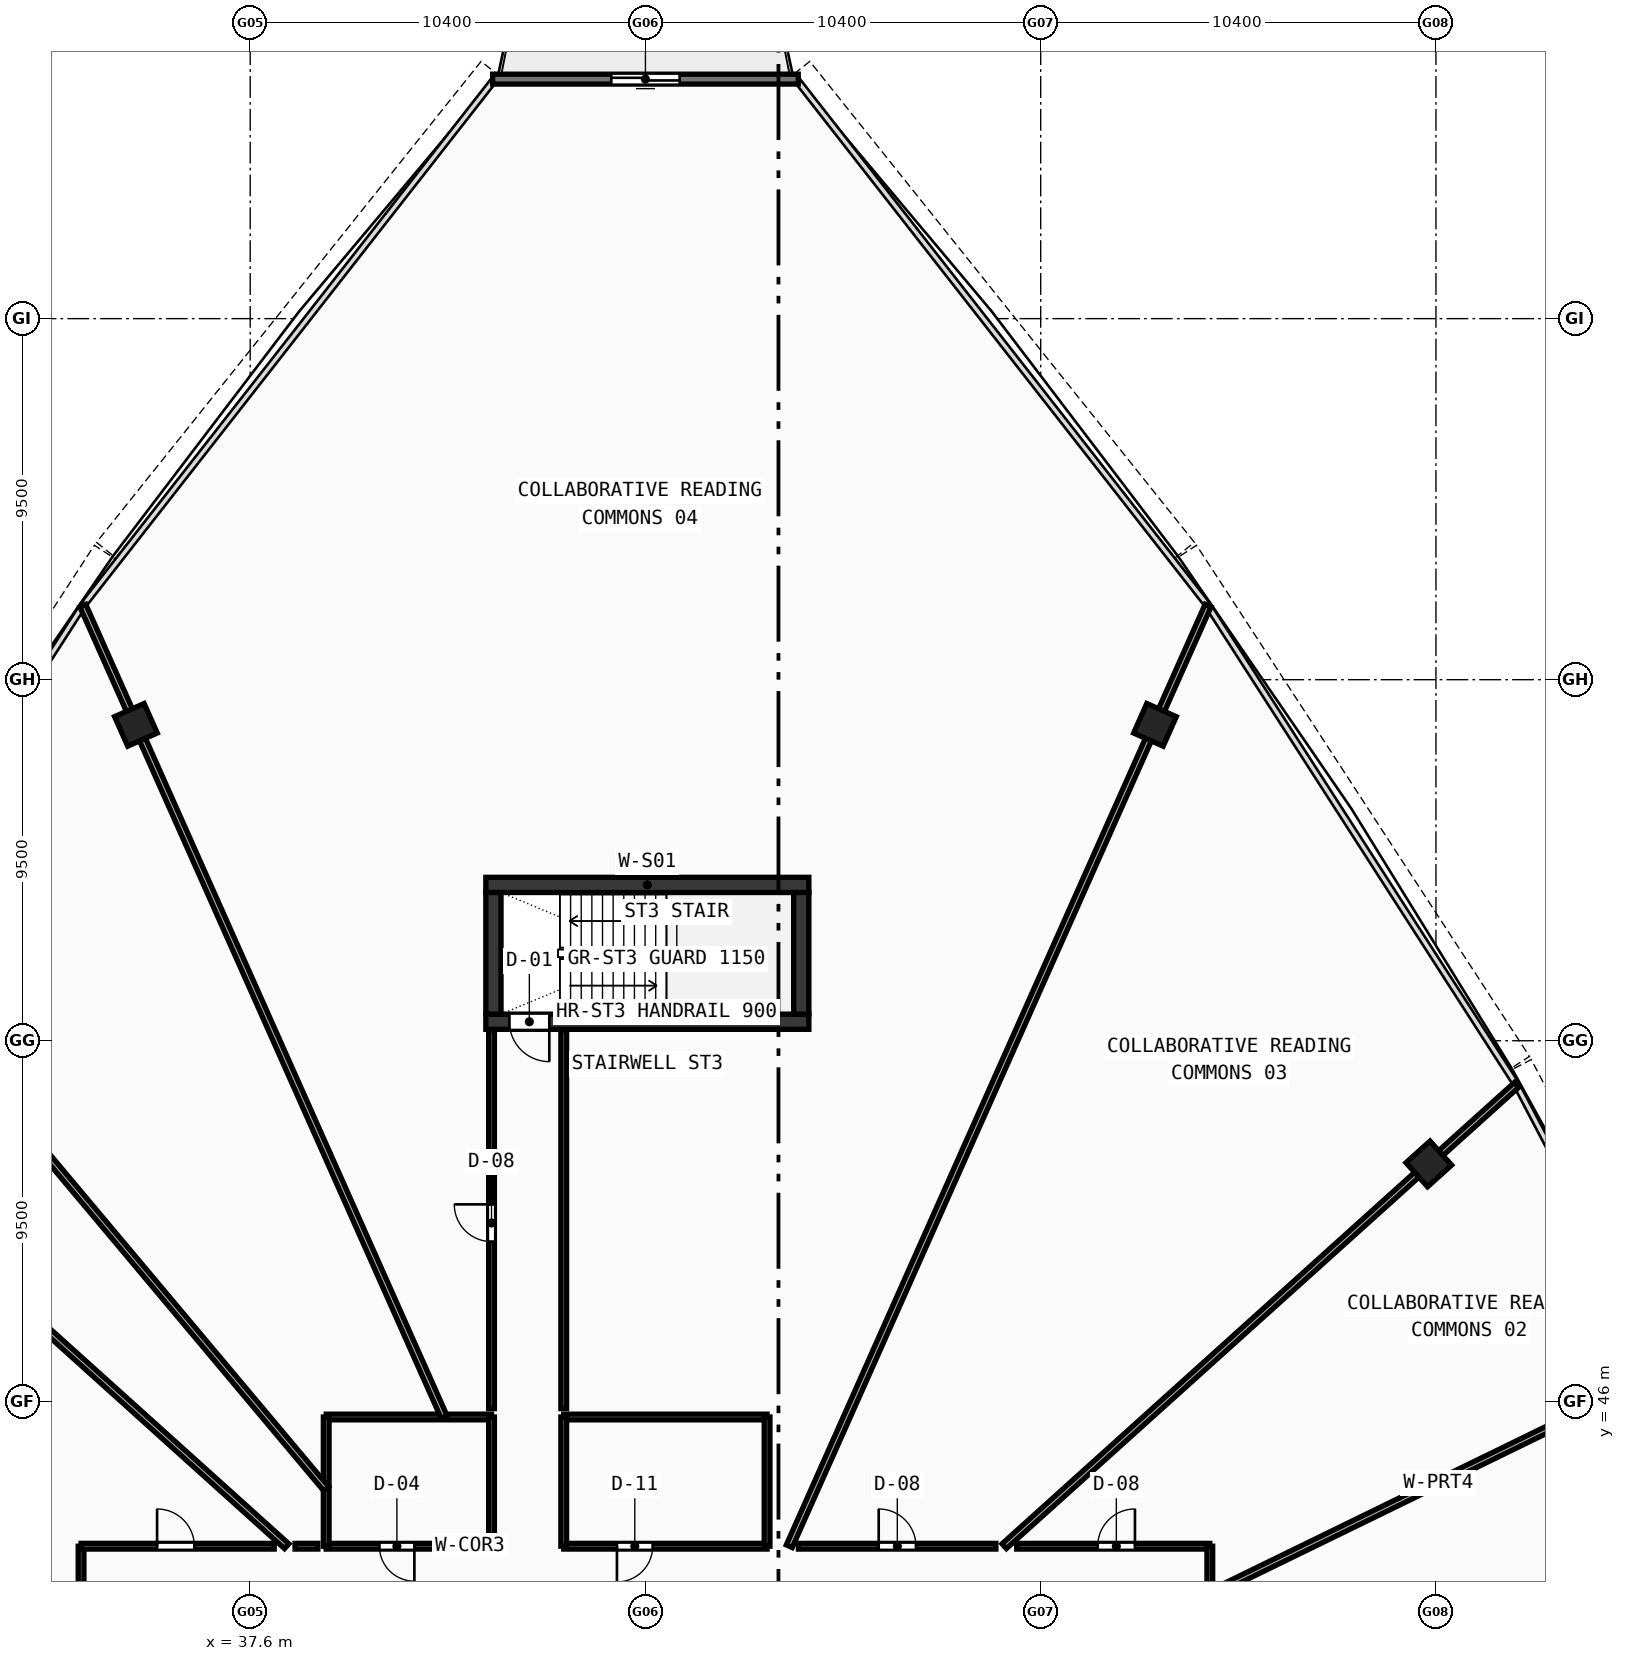
"""IFC4 building model, lengths in metres.
Left out: names, types, materials, properties, quantities, classifications, styles, units other than length and angle.
Written with IfcOpenShell. Run it as: python <this file> out.ifc"""

import sys

from ifc_helpers import new_model, si_unit, direction, frame, frame_2d, origin, origin_with_axes, origin_2d, place, context, subcontext, project, spatial, rectangle, hollow_rectangle, extrude, source, transform, mapped, element, fill, save


model = new_model("IFC4")
c1 = context("Model", 3, precision=1e-05, world=origin(), true_north=direction((0.0, 1.0)))
c2 = subcontext(c1, "Body", "Model", "MODEL_VIEW")
j1 = project(units=[si_unit("LENGTHUNIT", "METRE"), si_unit("PLANEANGLEUNIT", "RADIAN")], contexts=[c1])
p1 = place(None, origin())
s1 = spatial("IfcSite", under=j1, at=p1, CompositionType="ELEMENT")
p2 = place(p1, origin())
s2 = spatial("IfcBuilding", under=s1, at=p2, CompositionType="ELEMENT")
p3 = place(p2, frame((0.0, 0.0, 233.34)))
s3 = spatial("IfcBuildingStorey", under=s2, at=p3, CompositionType="ELEMENT", Elevation=233.34)
p4 = place(p3, frame((43.8, 59.6, 0.0), z_axis=(0.0, 0.0, 1.0), x_axis=(1.0, 0.0, 0.0)))
e1 = element("IfcWall", 1, at=p4, inside=s3, PredefinedType="SHEAR", context=c2, shape_type="SweptSolid", body=[
    extrude(rectangle(XDim=8.5, YDim=0.4, at=frame_2d((4.25, 0.0))), origin(), (0.0, 0.0, 1.0), 3.47),
])
p5 = place(p3, frame((43.8, 56.0, 0.0), z_axis=(0.0, 0.0, 1.0), x_axis=(1.0, 0.0, 0.0)))
e2 = element("IfcWall", 2, at=p5, inside=s3, PredefinedType="SHEAR", context=c2, shape_type="SweptSolid", body=[
    extrude(rectangle(XDim=8.5, YDim=0.4, at=frame_2d((4.25, 0.0))), origin(), (0.0, 0.0, 1.0), 3.47),
])
p6 = place(p5, frame((0.62, 0.0, 0.0)))
e3 = element("IfcOpeningElement", 3, at=p6, cuts=e2, PredefinedType="OPENING", context=c2, shape_type="SweptSolid", body=[
    extrude(rectangle(XDim=1.05, YDim=2.1, at=frame_2d((0.525, 1.05))), frame((0.0, 0.21, 0.0), z_axis=(0.0, -1.0, 0.0), x_axis=(1.0, 0.0, 0.0)), (0.0, 0.0, 1.0), 0.42),
])
for number, where, z_axis, x_axis in (
    (4, (44.0, 56.2, 0.0), (0.0, 0.0, 1.0), (0.0, 1.0, 0.0)),
    (5, (52.1, 56.2, 0.0), (0.0, 0.0, 1.0), (0.0, 1.0, 0.0)),
):
    element("IfcWall", number, at=place(p3, frame(where, z_axis=z_axis, x_axis=x_axis)), inside=s3, PredefinedType="SHEAR", context=c2, shape_type="SweptSolid", body=[
        extrude(rectangle(XDim=3.2, YDim=0.4, at=frame_2d((1.6, 0.0))), origin(), (0.0, 0.0, 1.0), 3.47),
    ])
m1 = source(origin(), c2, "Body", "SweptSolid", [
    extrude(hollow_rectangle(XDim=0.85, YDim=0.85, WallThickness=0.034, at=origin_2d()), origin(), (0.0, 0.0, 1.0), 3.73),
])
for number, where, z_axis, x_axis in (
    (6, (68.612, 52.259, -0.26), (0.0, 0.0, 1.0), (-0.669, 0.743, 0.0)),
    (7, (61.407, 63.812, -0.26), (0.0, 0.0, 1.0), (-0.914, 0.407, 0.0)),
    (8, (34.593, 63.812, -0.26), (0.0, 0.0, 1.0), (-0.914, -0.407, 0.0)),
):
    element("IfcColumn", number, at=place(p3, frame(where, z_axis=z_axis, x_axis=x_axis)), inside=s3, PredefinedType="COLUMN", context=c2, shape_type="MappedRepresentation", body=[
        mapped(m1, transform((0.0, 0.0, 0.0), scale=1.0)),
    ])
p7 = place(p3, frame((52.021, 80.802, 0.0), z_axis=(0.0, 0.0, 1.0), x_axis=(-1.0, 0.0, 0.0)))
e9 = element("IfcWall", 9, at=p7, inside=s3, PredefinedType="STANDARD", context=c2, shape_type="SweptSolid", body=[
    extrude(rectangle(XDim=8.042, YDim=0.26, at=frame_2d((4.021, 0.0))), origin(), (0.0, 0.0, 1.0), 3.47),
])
p8 = place(p7, frame((3.121, 0.0, 0.0)))
e10 = element("IfcOpeningElement", 10, at=p8, cuts=e9, PredefinedType="OPENING", context=c2, shape_type="SweptSolid", body=[
    extrude(rectangle(XDim=1.8, YDim=2.15, at=frame_2d((0.9, 1.075))), frame((0.0, 0.14, 0.0), z_axis=(0.0, -1.0, 0.0), x_axis=(1.0, 0.0, 0.0)), (0.0, 0.0, 1.0), 0.28),
])
p9 = place(p3, frame((39.6, 42.2, 0.0), z_axis=(0.0, 0.0, 1.0), x_axis=(1.0, 0.0, 0.0)))
e11 = element("IfcWall", 11, at=p9, inside=s3, PredefinedType="PARTITIONING", context=c2, shape_type="SweptSolid", body=[
    extrude(rectangle(XDim=4.35, YDim=0.15, at=frame_2d((2.175, 0.0))), origin(), (0.0, 0.0, 1.0), 3.47),
])
p10 = place(p9, frame((1.4, 0.0, 0.0)))
e12 = element("IfcOpeningElement", 12, at=p10, cuts=e11, PredefinedType="OPENING", context=c2, shape_type="SweptSolid", body=[
    extrude(rectangle(XDim=0.92, YDim=2.1, at=frame_2d((0.46, 1.05))), frame((0.0, 0.085, 0.0), z_axis=(0.0, -1.0, 0.0), x_axis=(1.0, 0.0, 0.0)), (0.0, 0.0, 1.0), 0.17),
])
p11 = place(p3, frame((39.6, 45.6, 0.0), z_axis=(0.0, 0.0, 1.0), x_axis=(1.0, 0.0, 0.0)))
e13 = element("IfcWall", 13, at=p11, inside=s3, PredefinedType="PARTITIONING", context=c2, shape_type="SweptSolid", body=[
    extrude(rectangle(XDim=4.35, YDim=0.15, at=frame_2d((2.175, 0.0))), origin(), (0.0, 0.0, 1.0), 2.82),
])
p12 = place(p3, frame((39.6, 42.2, 0.0), z_axis=(0.0, 0.0, 1.0), x_axis=(0.0, 1.0, 0.0)))
e14 = element("IfcWall", 14, at=p12, inside=s3, PredefinedType="PARTITIONING", context=c2, shape_type="SweptSolid", body=[
    extrude(rectangle(XDim=3.4, YDim=0.15, at=frame_2d((1.7, 0.0))), origin(), (0.0, 0.0, 1.0), 3.47),
])
p13 = place(p3, frame((43.95, 42.2, 0.0), z_axis=(0.0, 0.0, 1.0), x_axis=(0.0, 1.0, 0.0)))
e15 = element("IfcWall", 15, at=p13, inside=s3, PredefinedType="PARTITIONING", context=c2, shape_type="SweptSolid", body=[
    extrude(rectangle(XDim=3.4, YDim=0.15, at=frame_2d((1.7, 0.0))), origin(), (0.0, 0.0, 1.0), 2.82),
])
p14 = place(p3, frame((45.85, 42.2, 0.0), z_axis=(0.0, 0.0, 1.0), x_axis=(1.0, 0.0, 0.0)))
e16 = element("IfcWall", 16, at=p14, inside=s3, PredefinedType="PARTITIONING", context=c2, shape_type="SweptSolid", body=[
    extrude(rectangle(XDim=5.35, YDim=0.15, at=frame_2d((2.675, 0.0))), origin(), (0.0, 0.0, 1.0), 3.47),
])
p15 = place(p14, frame((1.4, 0.0, 0.0)))
e17 = element("IfcOpeningElement", 17, at=p15, cuts=e16, PredefinedType="OPENING", context=c2, shape_type="SweptSolid", body=[
    extrude(rectangle(XDim=0.94, YDim=2.1, at=frame_2d((0.47, 1.05))), frame((0.0, 0.085, 0.0), z_axis=(0.0, -1.0, 0.0), x_axis=(1.0, 0.0, 0.0)), (0.0, 0.0, 1.0), 0.17),
])
p16 = place(p3, frame((45.85, 45.6, 0.0), z_axis=(0.0, 0.0, 1.0), x_axis=(1.0, 0.0, 0.0)))
e18 = element("IfcWall", 18, at=p16, inside=s3, PredefinedType="PARTITIONING", context=c2, shape_type="SweptSolid", body=[
    extrude(rectangle(XDim=5.35, YDim=0.15, at=frame_2d((2.675, 0.0))), origin(), (0.0, 0.0, 1.0), 3.47),
])
for number, where, z_axis, x_axis in (
    (19, (45.85, 42.2, 0.0), (0.0, 0.0, 1.0), (0.0, 1.0, 0.0)),
    (20, (51.2, 42.2, 0.0), (0.0, 0.0, 1.0), (0.0, 1.0, 0.0)),
):
    element("IfcWall", number, at=place(p3, frame(where, z_axis=z_axis, x_axis=x_axis)), inside=s3, PredefinedType="PARTITIONING", context=c2, shape_type="SweptSolid", body=[
        extrude(rectangle(XDim=3.4, YDim=0.15, at=frame_2d((1.7, 0.0))), origin(), (0.0, 0.0, 1.0), 3.47),
    ])
p17 = place(p3, frame((62.85, 40.943, 0.0), z_axis=(0.0, 0.0, 1.0), x_axis=(0.89879807188, 0.438362893029, 0.0)))
e21 = element("IfcWall", 21, at=p17, inside=s3, PredefinedType="PARTITIONING", context=c2, shape_type="SweptSolid", body=[
    extrude(rectangle(XDim=13.384, YDim=0.17, at=frame_2d((6.692, 0.0))), origin(), (0.0, 0.0, 1.0), 2.82),
])
p18 = place(p3, frame((57.44, 42.2, 0.0), z_axis=(0.0, 0.0, 1.0), x_axis=(0.743147575456, 0.669127552185, 0.0)))
e22 = element("IfcWall", 22, at=p18, inside=s3, PredefinedType="PARTITIONING", context=c2, shape_type="SweptSolid", body=[
    extrude(rectangle(XDim=18.141, YDim=0.17, at=frame_2d((9.07, 0.0))), origin(), (0.0, 0.0, 1.0), 2.82),
])
p19 = place(p3, frame((51.784, 42.2, 0.0), z_axis=(0.0, 0.0, 1.0), x_axis=(0.406737084028, 0.913545261318, 0.0)))
e23 = element("IfcWall", 23, at=p19, inside=s3, PredefinedType="PARTITIONING", context=c2, shape_type="SweptSolid", body=[
    extrude(rectangle(XDim=27.09, YDim=0.17, at=frame_2d((13.545, 0.0))), origin(), (0.0, 0.0, 1.0), 2.82),
])
p20 = place(p3, frame((42.702, 45.6, 0.0), z_axis=(0.0, 0.0, 1.0), x_axis=(-0.406743256781, 0.913542513003, 0.0)))
e24 = element("IfcWall", 24, at=p20, inside=s3, PredefinedType="PARTITIONING", context=c2, shape_type="SweptSolid", body=[
    extrude(rectangle(XDim=23.368, YDim=0.17, at=frame_2d((11.684, 0.0))), origin(), (0.0, 0.0, 1.0), 2.82),
])
p21 = place(p3, frame((39.6, 43.711, 0.0), z_axis=(0.0, 0.0, 1.0), x_axis=(-0.642791950905, 0.766040800383, 0.0)))
e25 = element("IfcWall", 25, at=p21, inside=s3, PredefinedType="PARTITIONING", context=c2, shape_type="SweptSolid", body=[
    extrude(rectangle(XDim=18.806, YDim=0.17, at=frame_2d((9.403, 0.0))), origin(), (0.0, 0.0, 1.0), 2.82),
])
p22 = place(p3, frame((38.56, 42.2, 0.0), z_axis=(0.0, 0.0, 1.0), x_axis=(-0.743147575456, 0.669127552185, 0.0)))
e26 = element("IfcWall", 26, at=p22, inside=s3, PredefinedType="PARTITIONING", context=c2, shape_type="SweptSolid", body=[
    extrude(rectangle(XDim=18.141, YDim=0.17, at=frame_2d((9.07, 0.0))), origin(), (0.0, 0.0, 1.0), 2.82),
])
p23 = place(p3, frame((33.15, 38.525, 0.0), z_axis=(0.0, 0.0, 1.0), x_axis=(-0.951058452106, 0.309011036497, 0.0)))
e27 = element("IfcWall", 27, at=p23, inside=s3, PredefinedType="PARTITIONING", context=c2, shape_type="SweptSolid", body=[
    extrude(rectangle(XDim=14.714, YDim=0.17, at=frame_2d((7.357, 0.0))), origin(), (0.0, 0.0, 1.0), 2.82),
])
p24 = place(p3, frame((33.15, 38.756, 0.0), z_axis=(0.0, 0.0, 1.0), x_axis=(0.0, 1.0, 0.0)))
e28 = element("IfcWall", 28, at=p24, inside=s3, PredefinedType="PARTITIONING", context=c2, shape_type="SweptSolid", body=[
    extrude(rectangle(XDim=3.444, YDim=0.15, at=frame_2d((1.722, 0.0))), origin(), (0.0, 0.0, 1.0), 3.12),
])
p25 = place(p3, frame((33.15, 42.2, 0.0), z_axis=(0.0, 0.0, 1.0), x_axis=(1.0, 0.0, 0.0)))
e29 = element("IfcWall", 29, at=p25, inside=s3, PredefinedType="PARTITIONING", context=c2, shape_type="SweptSolid", body=[
    extrude(rectangle(XDim=5.081, YDim=0.15, at=frame_2d((2.541, 0.0))), origin(), (0.0, 0.0, 1.0), 3.12),
])
p26 = place(p25, frame((2.0, 0.0, 0.0)))
e30 = element("IfcOpeningElement", 30, at=p26, cuts=e29, PredefinedType="OPENING", context=c2, shape_type="SweptSolid", body=[
    extrude(rectangle(XDim=0.98, YDim=2.12, at=frame_2d((0.49, 1.06))), frame((0.0, 0.085, 0.0), z_axis=(0.0, -1.0, 0.0), x_axis=(1.0, 0.0, 0.0)), (0.0, 0.0, 1.0), 0.17),
])
p27 = place(p3, frame((38.78, 42.2, 0.0), z_axis=(0.0, 0.0, 1.0), x_axis=(1.0, 0.0, 0.0)))
e31 = element("IfcWall", 31, at=p27, inside=s3, PredefinedType="PARTITIONING", context=c2, shape_type="SweptSolid", body=[
    extrude(rectangle(XDim=0.6, YDim=0.15, at=frame_2d((0.3, 0.0))), origin(), (0.0, 0.0, 1.0), 2.82),
])
p28 = place(p3, frame((43.95, 45.82, 0.0), z_axis=(0.0, 0.0, 1.0), x_axis=(0.0, 1.0, 0.0)))
e32 = element("IfcWall", 32, at=p28, inside=s3, PredefinedType="PARTITIONING", context=c2, shape_type="SweptSolid", body=[
    extrude(rectangle(XDim=9.96, YDim=0.15, at=frame_2d((4.98, 0.0))), origin(), (0.0, 0.0, 1.0), 3.12),
])
p29 = place(p28, frame((4.395, 0.0, 0.0)))
e33 = element("IfcOpeningElement", 33, at=p29, cuts=e32, PredefinedType="OPENING", context=c2, shape_type="SweptSolid", body=[
    extrude(rectangle(XDim=0.98, YDim=2.12, at=frame_2d((0.49, 1.06))), frame((0.0, 0.085, 0.0), z_axis=(0.0, -1.0, 0.0), x_axis=(1.0, 0.0, 0.0)), (0.0, 0.0, 1.0), 0.17),
])
p30 = place(p3, frame((45.85, 55.78, 0.0), z_axis=(0.0, 0.0, 1.0), x_axis=(0.0, -1.0, 0.0)))
e34 = element("IfcWall", 34, at=p30, inside=s3, PredefinedType="PARTITIONING", context=c2, shape_type="SweptSolid", body=[
    extrude(rectangle(XDim=9.96, YDim=0.15, at=frame_2d((4.98, 0.0))), origin(), (0.0, 0.0, 1.0), 3.12),
])
p31 = place(p3, frame((52.025, 42.2, 0.0), z_axis=(0.0, 0.0, 1.0), x_axis=(1.0, 0.0, 0.0)))
e35 = element("IfcWall", 35, at=p31, inside=s3, PredefinedType="PARTITIONING", context=c2, shape_type="SweptSolid", body=[
    extrude(rectangle(XDim=5.195, YDim=0.15, at=frame_2d((2.598, 0.0))), origin(), (0.0, 0.0, 1.0), 2.82),
])
p32 = place(p31, frame((2.112, 0.0, 0.0)))
e36 = element("IfcOpeningElement", 36, at=p32, cuts=e35, PredefinedType="OPENING", context=c2, shape_type="SweptSolid", body=[
    extrude(rectangle(XDim=0.98, YDim=2.12, at=frame_2d((0.49, 1.06))), frame((0.0, 0.085, 0.0), z_axis=(0.0, -1.0, 0.0), x_axis=(1.0, 0.0, 0.0)), (0.0, 0.0, 1.0), 0.17),
])
p33 = place(p3, frame((57.769, 42.2, 0.0), z_axis=(0.0, 0.0, 1.0), x_axis=(1.0, 0.0, 0.0)))
e37 = element("IfcWall", 37, at=p33, inside=s3, PredefinedType="PARTITIONING", context=c2, shape_type="SweptSolid", body=[
    extrude(rectangle(XDim=5.081, YDim=0.15, at=frame_2d((2.541, 0.0))), origin(), (0.0, 0.0, 1.0), 3.12),
])
p34 = place(p33, frame((2.131, 0.0, 0.0)))
e38 = element("IfcOpeningElement", 38, at=p34, cuts=e37, PredefinedType="OPENING", context=c2, shape_type="SweptSolid", body=[
    extrude(rectangle(XDim=0.98, YDim=2.12, at=frame_2d((0.49, 1.06))), frame((0.0, 0.085, 0.0), z_axis=(0.0, -1.0, 0.0), x_axis=(1.0, 0.0, 0.0)), (0.0, 0.0, 1.0), 0.17),
])
p35 = place(p3, frame((62.85, 42.2, 0.0), z_axis=(0.0, 0.0, 1.0), x_axis=(0.0, -1.0, 0.0)))
e39 = element("IfcWall", 39, at=p35, inside=s3, PredefinedType="PARTITIONING", context=c2, shape_type="SweptSolid", body=[
    extrude(rectangle(XDim=1.012, YDim=0.15, at=frame_2d((0.506, 0.0))), origin(), (0.0, 0.0, 1.0), 3.12),
])
m2 = source(origin(), c2, "Body", "SweptSolid", [
    extrude(rectangle(XDim=1.8, YDim=2.15, at=frame_2d((0.9, 1.075))), frame((0.0, 0.025, 0.0), z_axis=(0.0, -1.0, 0.0), x_axis=(1.0, 0.0, 0.0)), (0.0, 0.0, 1.0), 0.05),
])
p36 = place(p8, origin_with_axes())
e40 = element("IfcDoor", 40, at=p36, inside=s3, OperationType="DOUBLE_DOOR_SLIDING", PredefinedType="DOOR", context=c2, shape_type="MappedRepresentation", body=[
    mapped(m2, transform((0.0, 0.0, 0.0), scale=1.0)),
])
fill(e10, e40)
m3 = source(origin(), c2, "Body", "SweptSolid", [
    extrude(rectangle(XDim=1.05, YDim=2.1, at=frame_2d((0.525, 1.05))), frame((0.0, 0.025, 0.0), z_axis=(0.0, -1.0, 0.0), x_axis=(1.0, 0.0, 0.0)), (0.0, 0.0, 1.0), 0.05),
])
p37 = place(p6, frame((1.05, 0.0, 0.0), z_axis=(0.0, 0.0, 1.0), x_axis=(-1.0, 0.0, 0.0)))
e41 = element("IfcDoor", 41, at=p37, inside=s3, OperationType="SINGLE_SWING_LEFT", PredefinedType="DOOR", context=c2, shape_type="MappedRepresentation", body=[
    mapped(m3, transform((0.0, 0.0, 0.0), scale=1.0)),
])
fill(e3, e41)
m4 = source(origin(), c2, "Body", "SweptSolid", [
    extrude(rectangle(XDim=0.92, YDim=2.1, at=frame_2d((0.46, 1.05))), frame((0.0, 0.025, 0.0), z_axis=(0.0, -1.0, 0.0), x_axis=(1.0, 0.0, 0.0)), (0.0, 0.0, 1.0), 0.05),
])
p38 = place(p10, frame((0.92, 0.0, 0.0), z_axis=(0.0, 0.0, 1.0), x_axis=(-1.0, 0.0, 0.0)))
e42 = element("IfcDoor", 42, at=p38, inside=s3, OperationType="SINGLE_SWING_LEFT", PredefinedType="DOOR", context=c2, shape_type="MappedRepresentation", body=[
    mapped(m4, transform((0.0, 0.0, 0.0), scale=1.0)),
])
fill(e12, e42)
m5 = source(origin(), c2, "Body", "SweptSolid", [
    extrude(rectangle(XDim=0.94, YDim=2.1, at=frame_2d((0.47, 1.05))), frame((0.0, 0.025, 0.0), z_axis=(0.0, -1.0, 0.0), x_axis=(1.0, 0.0, 0.0)), (0.0, 0.0, 1.0), 0.05),
])
p39 = place(p15, frame((0.94, 0.0, 0.0), z_axis=(0.0, 0.0, 1.0), x_axis=(-1.0, 0.0, 0.0)))
e43 = element("IfcDoor", 43, at=p39, inside=s3, OperationType="SINGLE_SWING_RIGHT", PredefinedType="DOOR", context=c2, shape_type="MappedRepresentation", body=[
    mapped(m5, transform((0.0, 0.0, 0.0), scale=1.0)),
])
fill(e17, e43)
m6 = source(origin(), c2, "Body", "SweptSolid", [
    extrude(rectangle(XDim=0.98, YDim=2.12, at=frame_2d((0.49, 1.06))), frame((0.0, 0.025, 0.0), z_axis=(0.0, -1.0, 0.0), x_axis=(1.0, 0.0, 0.0)), (0.0, 0.0, 1.0), 0.05),
])
p40 = place(p34, origin_with_axes())
e44 = element("IfcDoor", 44, at=p40, inside=s3, OperationType="SINGLE_SWING_RIGHT", PredefinedType="DOOR", context=c2, shape_type="MappedRepresentation", body=[
    mapped(m6, transform((0.0, 0.0, 0.0), scale=1.0)),
])
fill(e38, e44)
p41 = place(p32, origin_with_axes())
e45 = element("IfcDoor", 45, at=p41, inside=s3, OperationType="SINGLE_SWING_LEFT", PredefinedType="DOOR", context=c2, shape_type="MappedRepresentation", body=[
    mapped(m6, transform((0.0, 0.0, 0.0), scale=1.0)),
])
fill(e36, e45)
p42 = place(p29, origin_with_axes())
e46 = element("IfcDoor", 46, at=p42, inside=s3, OperationType="SINGLE_SWING_RIGHT", PredefinedType="DOOR", context=c2, shape_type="MappedRepresentation", body=[
    mapped(m6, transform((0.0, 0.0, 0.0), scale=1.0)),
])
fill(e33, e46)
p43 = place(p26, origin_with_axes())
e47 = element("IfcDoor", 47, at=p43, inside=s3, OperationType="SINGLE_SWING_LEFT", PredefinedType="DOOR", context=c2, shape_type="MappedRepresentation", body=[
    mapped(m6, transform((0.0, 0.0, 0.0), scale=1.0)),
])
fill(e30, e47)
save(model, sys.argv[1])
